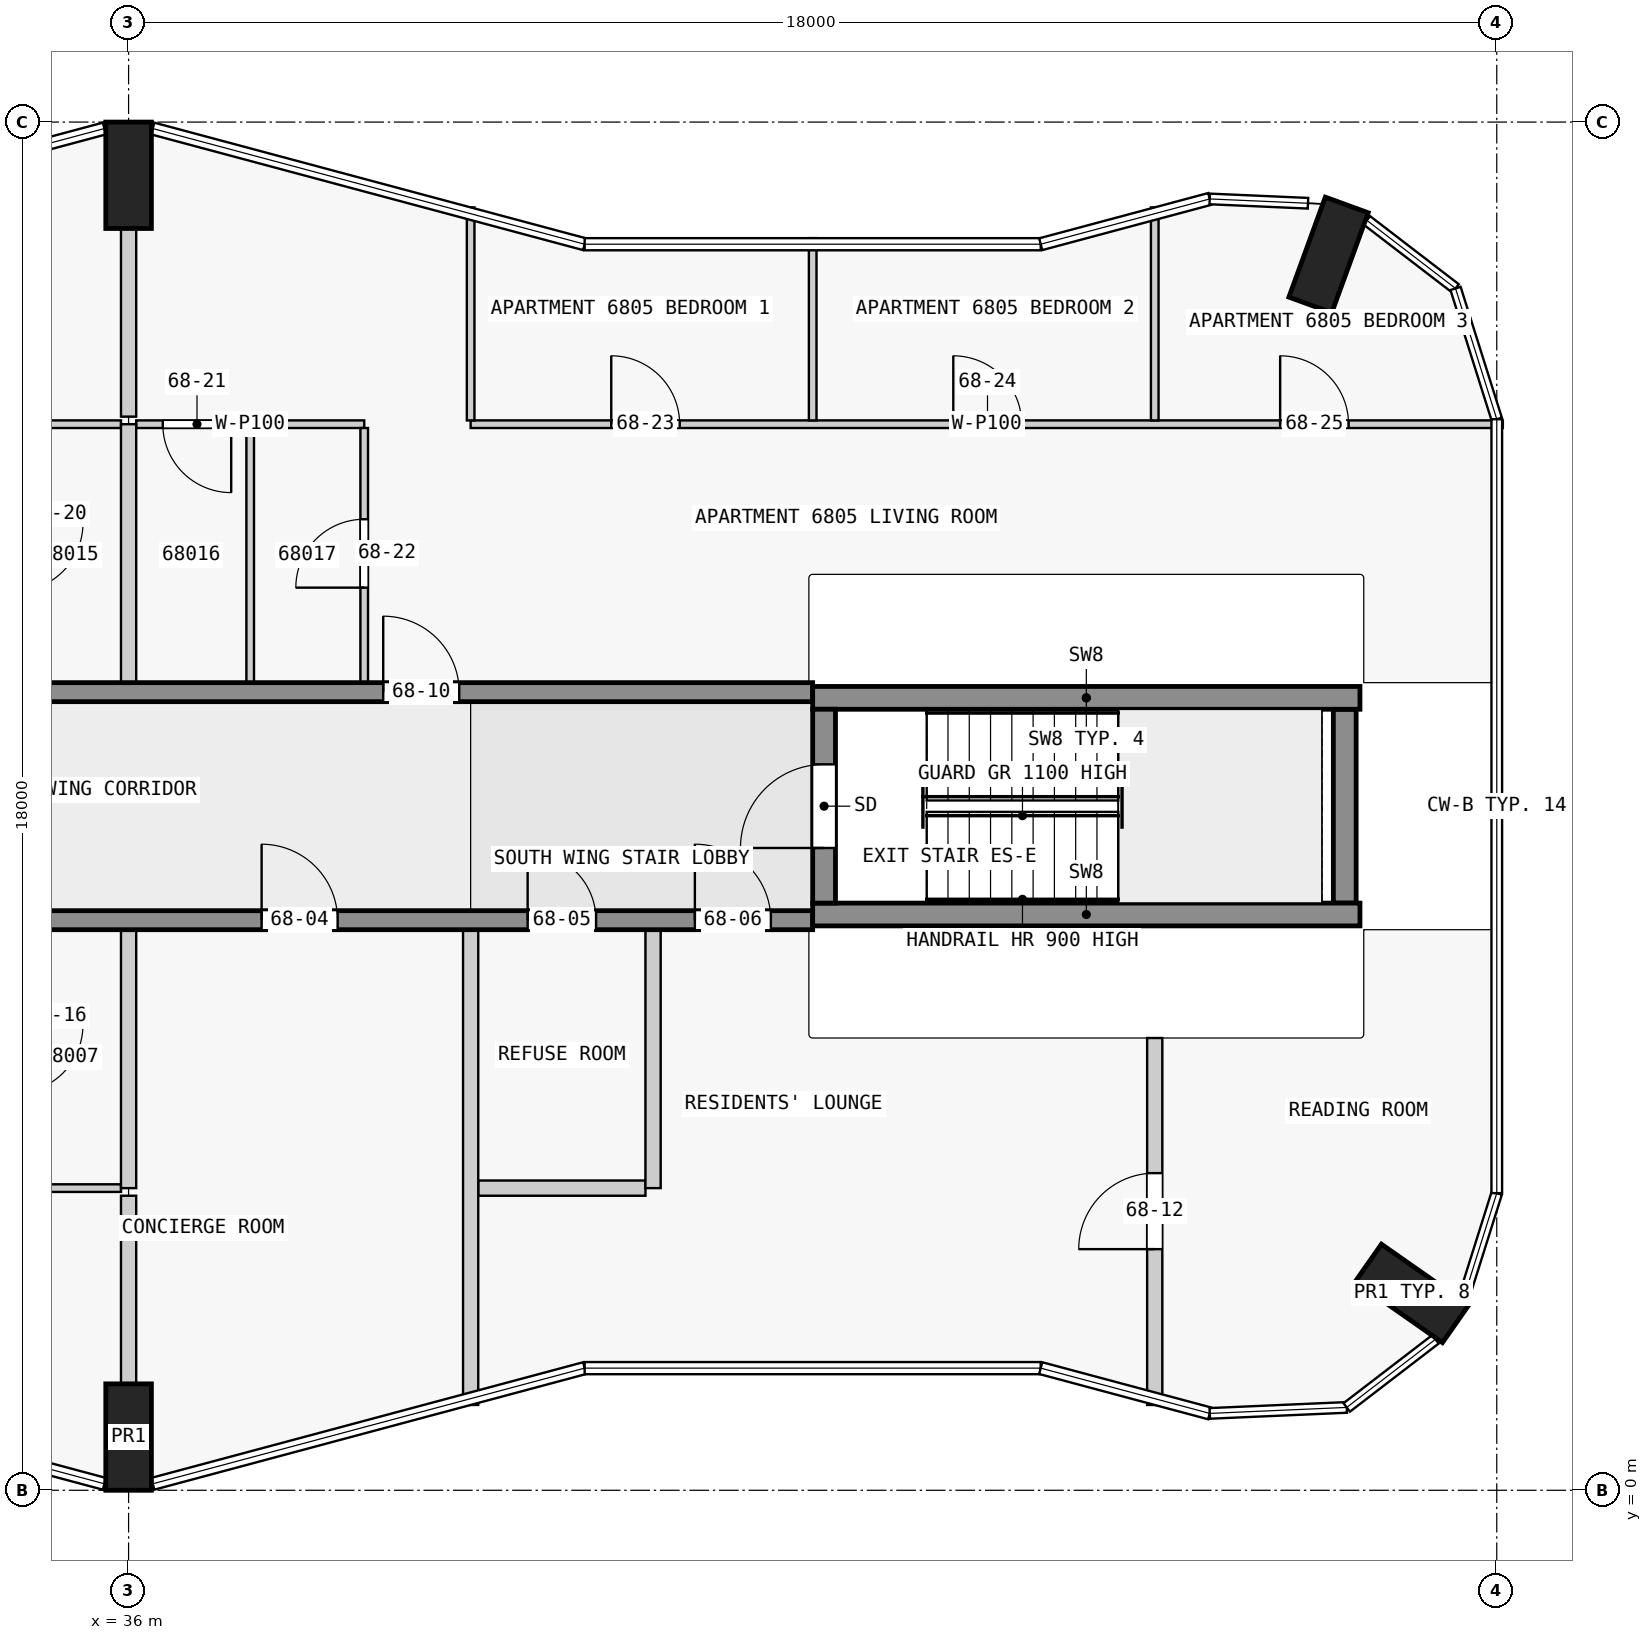
"""IFC4 building model, lengths in metres.
Left out: names, types, materials, properties, quantities, classifications, styles, units other than length and angle.
Written with IfcOpenShell. Run it as: python <this file> out.ifc"""

import sys

from ifc_helpers import new_model, si_unit, direction, frame, frame_2d, origin, origin_2d, place, context, subcontext, project, spatial, rectangle, extrude, element, fill, save


model = new_model("IFC4")
c1 = context("Model", 3, precision=1e-05, world=origin(), true_north=direction((0.0, 1.0)))
c2 = subcontext(c1, "Body", "Model", "MODEL_VIEW")
j1 = project(units=[si_unit("LENGTHUNIT", "METRE"), si_unit("PLANEANGLEUNIT", "RADIAN")], contexts=[c1])
p1 = place(None, origin())
s1 = spatial("IfcSite", under=j1, at=p1, CompositionType="ELEMENT")
p2 = place(p1, origin())
s2 = spatial("IfcBuilding", under=s1, at=p2, CompositionType="ELEMENT")
p3 = place(p2, frame((0.0, 0.0, 259.9)))
s3 = spatial("IfcBuildingStorey", under=s2, at=p3, CompositionType="ELEMENT", Elevation=259.9)
for number, where, z_axis, x_axis in (
    (1, (36.0, 0.7, 0.0), (0.0, 0.0, 1.0), (1.0, 0.0, 0.0)),
    (2, (52.884, 2.59, 0.0), (0.0, 0.0, 1.0), (0.574, 0.819, 0.0)),
    (3, (51.787, 16.252, 0.0), (0.0, 0.0, 1.0), (-0.94, 0.342, 0.0)),
    (4, (36.0, 17.3, 0.0), (0.0, 0.0, 1.0), (1.0, 0.0, 0.0)),
):
    element("IfcColumn", number, at=place(p3, frame(where, z_axis=z_axis, x_axis=x_axis)), inside=s3, PredefinedType="COLUMN", context=c2, shape_type="SweptSolid", body=[
        extrude(rectangle(XDim=0.6, YDim=1.4, at=origin_2d()), origin(), (0.0, 0.0, 1.0), 3.5),
    ])
p4 = place(p3, frame((45.15, 7.725, 0.0), z_axis=(0.0, 0.0, 1.0), x_axis=(0.0, 1.0, 0.0)))
e5 = element("IfcWall", 5, at=p4, inside=s3, PredefinedType="SHEAR", context=c2, shape_type="SweptSolid", body=[
    extrude(rectangle(XDim=2.55, YDim=0.3, at=frame_2d((1.275, 0.0))), origin(), (0.0, 0.0, 1.0), 3.5),
])
p5 = place(p4, frame((0.725, 0.0, 0.0)))
e6 = element("IfcOpeningElement", 6, at=p5, cuts=e5, PredefinedType="OPENING", context=c2, shape_type="SweptSolid", body=[
    extrude(rectangle(XDim=1.1, YDim=2.1, at=frame_2d((0.55, 1.05))), frame((0.0, 0.16, 0.0), z_axis=(0.0, -1.0, 0.0), x_axis=(1.0, 0.0, 0.0)), (0.0, 0.0, 1.0), 0.32),
])
p6 = place(p3, frame((52.0, 7.725, 0.0), z_axis=(0.0, 0.0, 1.0), x_axis=(0.0, 1.0, 0.0)))
e7 = element("IfcWall", 7, at=p6, inside=s3, PredefinedType="SHEAR", context=c2, shape_type="SweptSolid", body=[
    extrude(rectangle(XDim=2.55, YDim=0.3, at=frame_2d((1.275, 0.0))), origin(), (0.0, 0.0, 1.0), 3.5),
])
for number, where, z_axis, x_axis in (
    (8, (45.0, 7.575, 0.0), (0.0, 0.0, 1.0), (1.0, 0.0, 0.0)),
    (9, (45.0, 10.425, 0.0), (0.0, 0.0, 1.0), (1.0, 0.0, 0.0)),
):
    element("IfcWall", number, at=place(p3, frame(where, z_axis=z_axis, x_axis=x_axis)), inside=s3, PredefinedType="SHEAR", context=c2, shape_type="SweptSolid", body=[
        extrude(rectangle(XDim=7.2, YDim=0.3, at=frame_2d((3.6, 0.0))), origin(), (0.0, 0.0, 1.0), 3.5),
    ])
p7 = place(p3, frame((22.5, 7.5, 0.0), z_axis=(0.0, 0.0, 1.0), x_axis=(1.0, 0.0, 0.0)))
e10 = element("IfcWall", 10, at=p7, inside=s3, PredefinedType="SHEAR", context=c2, shape_type="SweptSolid", body=[
    extrude(rectangle(XDim=22.5, YDim=0.25, at=frame_2d((11.25, 0.0))), origin(), (0.0, 0.0, 1.0), 3.25),
])
p8 = place(p7, frame((1.75, 0.0, 0.0)))
e11 = element("IfcOpeningElement", 11, at=p8, cuts=e10, PredefinedType="OPENING", context=c2, shape_type="SweptSolid", body=[
    extrude(rectangle(XDim=1.0, YDim=2.1, at=frame_2d((0.5, 1.05))), frame((0.0, 0.135, 0.0), z_axis=(0.0, -1.0, 0.0), x_axis=(1.0, 0.0, 0.0)), (0.0, 0.0, 1.0), 0.27),
])
p9 = place(p7, frame((5.85, 0.0, 0.0)))
e12 = element("IfcOpeningElement", 12, at=p9, cuts=e10, PredefinedType="OPENING", context=c2, shape_type="SweptSolid", body=[
    extrude(rectangle(XDim=1.8, YDim=2.1, at=frame_2d((0.9, 1.05))), frame((0.0, 0.135, 0.0), z_axis=(0.0, -1.0, 0.0), x_axis=(1.0, 0.0, 0.0)), (0.0, 0.0, 1.0), 0.27),
])
p10 = place(p7, frame((10.75, 0.0, 0.0)))
e13 = element("IfcOpeningElement", 13, at=p10, cuts=e10, PredefinedType="OPENING", context=c2, shape_type="SweptSolid", body=[
    extrude(rectangle(XDim=1.0, YDim=2.1, at=frame_2d((0.5, 1.05))), frame((0.0, 0.135, 0.0), z_axis=(0.0, -1.0, 0.0), x_axis=(1.0, 0.0, 0.0)), (0.0, 0.0, 1.0), 0.27),
])
p11 = place(p7, frame((15.25, 0.0, 0.0)))
e14 = element("IfcOpeningElement", 14, at=p11, cuts=e10, PredefinedType="OPENING", context=c2, shape_type="SweptSolid", body=[
    extrude(rectangle(XDim=1.0, YDim=2.1, at=frame_2d((0.5, 1.05))), frame((0.0, 0.135, 0.0), z_axis=(0.0, -1.0, 0.0), x_axis=(1.0, 0.0, 0.0)), (0.0, 0.0, 1.0), 0.27),
])
p12 = place(p7, frame((18.75, 0.0, 0.0)))
e15 = element("IfcOpeningElement", 15, at=p12, cuts=e10, PredefinedType="OPENING", context=c2, shape_type="SweptSolid", body=[
    extrude(rectangle(XDim=0.9, YDim=2.1, at=frame_2d((0.45, 1.05))), frame((0.0, 0.135, 0.0), z_axis=(0.0, -1.0, 0.0), x_axis=(1.0, 0.0, 0.0)), (0.0, 0.0, 1.0), 0.27),
])
p13 = place(p7, frame((20.95, 0.0, 0.0)))
e16 = element("IfcOpeningElement", 16, at=p13, cuts=e10, PredefinedType="OPENING", context=c2, shape_type="SweptSolid", body=[
    extrude(rectangle(XDim=1.0, YDim=2.1, at=frame_2d((0.5, 1.05))), frame((0.0, 0.135, 0.0), z_axis=(0.0, -1.0, 0.0), x_axis=(1.0, 0.0, 0.0)), (0.0, 0.0, 1.0), 0.27),
])
p14 = place(p3, frame((22.5, 10.5, 0.0), z_axis=(0.0, 0.0, 1.0), x_axis=(1.0, 0.0, 0.0)))
e17 = element("IfcWall", 17, at=p14, inside=s3, PredefinedType="SHEAR", context=c2, shape_type="SweptSolid", body=[
    extrude(rectangle(XDim=22.5, YDim=0.25, at=frame_2d((11.25, 0.0))), origin(), (0.0, 0.0, 1.0), 3.25),
])
p15 = place(p14, frame((1.75, 0.0, 0.0)))
e18 = element("IfcOpeningElement", 18, at=p15, cuts=e17, PredefinedType="OPENING", context=c2, shape_type="SweptSolid", body=[
    extrude(rectangle(XDim=1.0, YDim=2.1, at=frame_2d((0.5, 1.05))), frame((0.0, 0.135, 0.0), z_axis=(0.0, -1.0, 0.0), x_axis=(1.0, 0.0, 0.0)), (0.0, 0.0, 1.0), 0.27),
])
p16 = place(p14, frame((6.25, 0.0, 0.0)))
e19 = element("IfcOpeningElement", 19, at=p16, cuts=e17, PredefinedType="OPENING", context=c2, shape_type="SweptSolid", body=[
    extrude(rectangle(XDim=1.0, YDim=2.1, at=frame_2d((0.5, 1.05))), frame((0.0, 0.135, 0.0), z_axis=(0.0, -1.0, 0.0), x_axis=(1.0, 0.0, 0.0)), (0.0, 0.0, 1.0), 0.27),
])
p17 = place(p14, frame((10.75, 0.0, 0.0)))
e20 = element("IfcOpeningElement", 20, at=p17, cuts=e17, PredefinedType="OPENING", context=c2, shape_type="SweptSolid", body=[
    extrude(rectangle(XDim=1.0, YDim=2.1, at=frame_2d((0.5, 1.05))), frame((0.0, 0.135, 0.0), z_axis=(0.0, -1.0, 0.0), x_axis=(1.0, 0.0, 0.0)), (0.0, 0.0, 1.0), 0.27),
])
p18 = place(p14, frame((16.85, 0.0, 0.0)))
e21 = element("IfcOpeningElement", 21, at=p18, cuts=e17, PredefinedType="OPENING", context=c2, shape_type="SweptSolid", body=[
    extrude(rectangle(XDim=1.0, YDim=2.1, at=frame_2d((0.5, 1.05))), frame((0.0, 0.135, 0.0), z_axis=(0.0, -1.0, 0.0), x_axis=(1.0, 0.0, 0.0)), (0.0, 0.0, 1.0), 0.27),
])
p19 = place(p3, frame((34.55, 3.975, 0.0), z_axis=(0.0, 0.0, 1.0), x_axis=(1.0, 0.0, 0.0)))
e22 = element("IfcWall", 22, at=p19, inside=s3, PredefinedType="PARTITIONING", context=c2, shape_type="SweptSolid", body=[
    extrude(rectangle(XDim=1.35, YDim=0.1, at=frame_2d((0.675, 0.0))), origin(), (0.0, 0.0, 1.0), 3.25),
])
p20 = place(p3, frame((40.6, 3.975, 0.0), z_axis=(0.0, 0.0, 1.0), x_axis=(1.0, 0.0, 0.0)))
e23 = element("IfcWall", 23, at=p20, inside=s3, PredefinedType="PARTITIONING", context=c2, shape_type="SweptSolid", body=[
    extrude(rectangle(XDim=2.2, YDim=0.2, at=frame_2d((1.1, 0.0))), origin(), (0.0, 0.0, 1.0), 3.25),
])
p21 = place(p3, frame((35.9, 14.025, 0.0), z_axis=(0.0, 0.0, 1.0), x_axis=(-1.0, 0.0, 0.0)))
e24 = element("IfcWall", 24, at=p21, inside=s3, PredefinedType="PARTITIONING", context=c2, shape_type="SweptSolid", body=[
    extrude(rectangle(XDim=1.4, YDim=0.1, at=frame_2d((0.7, 0.0))), origin(), (0.0, 0.0, 1.0), 3.25),
])
p22 = place(p3, frame((39.1, 14.025, 0.0), z_axis=(0.0, 0.0, 1.0), x_axis=(-1.0, 0.0, 0.0)))
e25 = element("IfcWall", 25, at=p22, inside=s3, PredefinedType="PARTITIONING", context=c2, shape_type="SweptSolid", body=[
    extrude(rectangle(XDim=3.0, YDim=0.1, at=frame_2d((1.5, 0.0))), origin(), (0.0, 0.0, 1.0), 3.25),
])
p23 = place(p22, frame((1.75, 0.0, 0.0)))
e26 = element("IfcOpeningElement", 26, at=p23, cuts=e25, PredefinedType="OPENING", context=c2, shape_type="SweptSolid", body=[
    extrude(rectangle(XDim=0.9, YDim=2.1, at=frame_2d((0.45, 1.05))), frame((0.0, 0.06, 0.0), z_axis=(0.0, -1.0, 0.0), x_axis=(1.0, 0.0, 0.0)), (0.0, 0.0, 1.0), 0.12),
])
p24 = place(p3, frame((40.5, 14.025, 0.0), z_axis=(0.0, 0.0, 1.0), x_axis=(1.0, 0.0, 0.0)))
e27 = element("IfcWall", 27, at=p24, inside=s3, PredefinedType="PARTITIONING", context=c2, shape_type="SweptSolid", body=[
    extrude(rectangle(XDim=13.58, YDim=0.1, at=frame_2d((6.79, 0.0))), origin(), (0.0, 0.0, 1.0), 3.25),
])
p25 = place(p24, frame((1.85, 0.0, 0.0)))
e28 = element("IfcOpeningElement", 28, at=p25, cuts=e27, PredefinedType="OPENING", context=c2, shape_type="SweptSolid", body=[
    extrude(rectangle(XDim=0.9, YDim=2.1, at=frame_2d((0.45, 1.05))), frame((0.0, 0.06, 0.0), z_axis=(0.0, -1.0, 0.0), x_axis=(1.0, 0.0, 0.0)), (0.0, 0.0, 1.0), 0.12),
])
p26 = place(p24, frame((6.35, 0.0, 0.0)))
e29 = element("IfcOpeningElement", 29, at=p26, cuts=e27, PredefinedType="OPENING", context=c2, shape_type="SweptSolid", body=[
    extrude(rectangle(XDim=0.9, YDim=2.1, at=frame_2d((0.45, 1.05))), frame((0.0, 0.06, 0.0), z_axis=(0.0, -1.0, 0.0), x_axis=(1.0, 0.0, 0.0)), (0.0, 0.0, 1.0), 0.12),
])
p27 = place(p24, frame((10.65, 0.0, 0.0)))
e30 = element("IfcOpeningElement", 30, at=p27, cuts=e27, PredefinedType="OPENING", context=c2, shape_type="SweptSolid", body=[
    extrude(rectangle(XDim=0.9, YDim=2.1, at=frame_2d((0.45, 1.05))), frame((0.0, 0.06, 0.0), z_axis=(0.0, -1.0, 0.0), x_axis=(1.0, 0.0, 0.0)), (0.0, 0.0, 1.0), 0.12),
])
for number, where, z_axis, x_axis in (
    (31, (36.0, 3.875, 0.0), (0.0, 0.0, 1.0), (0.0, -1.0, 0.0)),
    (32, (36.0, 16.6, 0.0), (0.0, 0.0, 1.0), (0.0, -1.0, 0.0)),
):
    element("IfcWall", number, at=place(p3, frame(where, z_axis=z_axis, x_axis=x_axis)), inside=s3, PredefinedType="PARTITIONING", context=c2, shape_type="SweptSolid", body=[
        extrude(rectangle(XDim=2.475, YDim=0.2, at=frame_2d((1.238, 0.0))), origin(), (0.0, 0.0, 1.0), 3.25),
    ])
for number, where, z_axis, x_axis in (
    (33, (36.0, 3.975, 0.0), (0.0, 0.0, 1.0), (0.0, 1.0, 0.0)),
    (34, (36.0, 10.625, 0.0), (0.0, 0.0, 1.0), (0.0, 1.0, 0.0)),
):
    element("IfcWall", number, at=place(p3, frame(where, z_axis=z_axis, x_axis=x_axis)), inside=s3, PredefinedType="PARTITIONING", context=c2, shape_type="SweptSolid", body=[
        extrude(rectangle(XDim=3.4, YDim=0.2, at=frame_2d((1.7, 0.0))), origin(), (0.0, 0.0, 1.0), 3.25),
    ])
p28 = place(p3, frame((37.6, 10.625, 0.0), z_axis=(0.0, 0.0, 1.0), x_axis=(0.0, 1.0, 0.0)))
e35 = element("IfcWall", 35, at=p28, inside=s3, PredefinedType="PARTITIONING", context=c2, shape_type="SweptSolid", body=[
    extrude(rectangle(XDim=3.35, YDim=0.1, at=frame_2d((1.675, 0.0))), origin(), (0.0, 0.0, 1.0), 3.25),
])
p29 = place(p3, frame((39.1, 10.625, 0.0), z_axis=(0.0, 0.0, 1.0), x_axis=(0.0, 1.0, 0.0)))
e36 = element("IfcWall", 36, at=p29, inside=s3, PredefinedType="PARTITIONING", context=c2, shape_type="SweptSolid", body=[
    extrude(rectangle(XDim=3.35, YDim=0.1, at=frame_2d((1.675, 0.0))), origin(), (0.0, 0.0, 1.0), 3.25),
])
p30 = place(p29, frame((1.25, 0.0, 0.0)))
e37 = element("IfcOpeningElement", 37, at=p30, cuts=e36, PredefinedType="OPENING", context=c2, shape_type="SweptSolid", body=[
    extrude(rectangle(XDim=0.9, YDim=2.1, at=frame_2d((0.45, 1.05))), frame((0.0, 0.06, 0.0), z_axis=(0.0, -1.0, 0.0), x_axis=(1.0, 0.0, 0.0)), (0.0, 0.0, 1.0), 0.12),
])
p31 = place(p3, frame((40.5, 16.878, 0.0), z_axis=(0.0, 0.0, 1.0), x_axis=(0.0, -1.0, 0.0)))
e38 = element("IfcWall", 38, at=p31, inside=s3, PredefinedType="PARTITIONING", context=c2, shape_type="SweptSolid", body=[
    extrude(rectangle(XDim=2.803, YDim=0.1, at=frame_2d((1.401, 0.0))), origin(), (0.0, 0.0, 1.0), 3.25),
])
p32 = place(p3, frame((40.5, 1.122, 0.0), z_axis=(0.0, 0.0, 1.0), x_axis=(0.0, 1.0, 0.0)))
e39 = element("IfcWall", 39, at=p32, inside=s3, PredefinedType="PARTITIONING", context=c2, shape_type="SweptSolid", body=[
    extrude(rectangle(XDim=6.253, YDim=0.2, at=frame_2d((3.126, 0.0))), origin(), (0.0, 0.0, 1.0), 3.25),
])
p33 = place(p3, frame((42.9, 3.975, 0.0), z_axis=(0.0, 0.0, 1.0), x_axis=(0.0, 1.0, 0.0)))
e40 = element("IfcWall", 40, at=p33, inside=s3, PredefinedType="PARTITIONING", context=c2, shape_type="SweptSolid", body=[
    extrude(rectangle(XDim=3.4, YDim=0.2, at=frame_2d((1.7, 0.0))), origin(), (0.0, 0.0, 1.0), 3.25),
])
p34 = place(p3, frame((45.0, 14.075, 0.0), z_axis=(0.0, 0.0, 1.0), x_axis=(0.0, 1.0, 0.0)))
e41 = element("IfcWall", 41, at=p34, inside=s3, PredefinedType="PARTITIONING", context=c2, shape_type="SweptSolid", body=[
    extrude(rectangle(XDim=2.398, YDim=0.1, at=frame_2d((1.199, 0.0))), origin(), (0.0, 0.0, 1.0), 3.25),
])
p35 = place(p3, frame((49.5, 14.075, 0.0), z_axis=(0.0, 0.0, 1.0), x_axis=(0.0, 1.0, 0.0)))
e42 = element("IfcWall", 42, at=p35, inside=s3, PredefinedType="PARTITIONING", context=c2, shape_type="SweptSolid", body=[
    extrude(rectangle(XDim=2.803, YDim=0.1, at=frame_2d((1.401, 0.0))), origin(), (0.0, 0.0, 1.0), 3.25),
])
p36 = place(p3, frame((49.5, 1.122, 0.0), z_axis=(0.0, 0.0, 1.0), x_axis=(0.0, 1.0, 0.0)))
e43 = element("IfcWall", 43, at=p36, inside=s3, PredefinedType="PARTITIONING", context=c2, shape_type="SweptSolid", body=[
    extrude(rectangle(XDim=4.828, YDim=0.2, at=frame_2d((2.414, 0.0))), origin(), (0.0, 0.0, 1.0), 3.25),
])
p37 = place(p36, frame((2.05, 0.0, 0.0)))
e44 = element("IfcOpeningElement", 44, at=p37, cuts=e43, PredefinedType="OPENING", context=c2, shape_type="SweptSolid", body=[
    extrude(rectangle(XDim=1.0, YDim=2.1, at=frame_2d((0.5, 1.05))), frame((0.0, 0.11, 0.0), z_axis=(0.0, -1.0, 0.0), x_axis=(1.0, 0.0, 0.0)), (0.0, 0.0, 1.0), 0.22),
])
p38 = place(p5, origin())
e45 = element("IfcDoor", 45, at=p38, inside=s3, OperationType="SINGLE_SWING_LEFT", PredefinedType="DOOR", context=c2, shape_type="SweptSolid", body=[
    extrude(rectangle(XDim=1.1, YDim=2.1, at=frame_2d((0.55, 1.05))), frame((0.0, 0.025, 0.0), z_axis=(0.0, -1.0, 0.0), x_axis=(1.0, 0.0, 0.0)), (0.0, 0.0, 1.0), 0.05),
])
fill(e6, e45)
p39 = place(p11, origin())
e46 = element("IfcDoor", 46, at=p39, inside=s3, OperationType="SINGLE_SWING_RIGHT", PredefinedType="DOOR", context=c2, shape_type="SweptSolid", body=[
    extrude(rectangle(XDim=1.0, YDim=2.1, at=frame_2d((0.5, 1.05))), frame((0.0, 0.025, 0.0), z_axis=(0.0, -1.0, 0.0), x_axis=(1.0, 0.0, 0.0)), (0.0, 0.0, 1.0), 0.05),
])
fill(e14, e46)
p40 = place(p12, origin())
e47 = element("IfcDoor", 47, at=p40, inside=s3, OperationType="SINGLE_SWING_RIGHT", PredefinedType="DOOR", context=c2, shape_type="SweptSolid", body=[
    extrude(rectangle(XDim=0.9, YDim=2.1, at=frame_2d((0.45, 1.05))), frame((0.0, 0.025, 0.0), z_axis=(0.0, -1.0, 0.0), x_axis=(1.0, 0.0, 0.0)), (0.0, 0.0, 1.0), 0.05),
])
fill(e15, e47)
p41 = place(p13, origin())
e48 = element("IfcDoor", 48, at=p41, inside=s3, OperationType="SINGLE_SWING_RIGHT", PredefinedType="DOOR", context=c2, shape_type="SweptSolid", body=[
    extrude(rectangle(XDim=1.0, YDim=2.1, at=frame_2d((0.5, 1.05))), frame((0.0, 0.025, 0.0), z_axis=(0.0, -1.0, 0.0), x_axis=(1.0, 0.0, 0.0)), (0.0, 0.0, 1.0), 0.05),
])
fill(e16, e48)
p42 = place(p18, origin())
e49 = element("IfcDoor", 49, at=p42, inside=s3, OperationType="SINGLE_SWING_RIGHT", PredefinedType="DOOR", context=c2, shape_type="SweptSolid", body=[
    extrude(rectangle(XDim=1.0, YDim=2.1, at=frame_2d((0.5, 1.05))), frame((0.0, 0.025, 0.0), z_axis=(0.0, -1.0, 0.0), x_axis=(1.0, 0.0, 0.0)), (0.0, 0.0, 1.0), 0.05),
])
fill(e21, e49)
p43 = place(p37, origin())
e50 = element("IfcDoor", 50, at=p43, inside=s3, OperationType="SINGLE_SWING_RIGHT", PredefinedType="DOOR", context=c2, shape_type="SweptSolid", body=[
    extrude(rectangle(XDim=1.0, YDim=2.1, at=frame_2d((0.5, 1.05))), frame((0.0, 0.025, 0.0), z_axis=(0.0, -1.0, 0.0), x_axis=(1.0, 0.0, 0.0)), (0.0, 0.0, 1.0), 0.05),
])
fill(e44, e50)
p44 = place(p23, origin())
e51 = element("IfcDoor", 51, at=p44, inside=s3, OperationType="SINGLE_SWING_RIGHT", PredefinedType="DOOR", context=c2, shape_type="SweptSolid", body=[
    extrude(rectangle(XDim=0.9, YDim=2.1, at=frame_2d((0.45, 1.05))), frame((0.0, 0.025, 0.0), z_axis=(0.0, -1.0, 0.0), x_axis=(1.0, 0.0, 0.0)), (0.0, 0.0, 1.0), 0.05),
])
fill(e26, e51)
p45 = place(p30, origin())
e52 = element("IfcDoor", 52, at=p45, inside=s3, OperationType="SINGLE_SWING_RIGHT", PredefinedType="DOOR", context=c2, shape_type="SweptSolid", body=[
    extrude(rectangle(XDim=0.9, YDim=2.1, at=frame_2d((0.45, 1.05))), frame((0.0, 0.025, 0.0), z_axis=(0.0, -1.0, 0.0), x_axis=(1.0, 0.0, 0.0)), (0.0, 0.0, 1.0), 0.05),
])
fill(e37, e52)
p46 = place(p25, origin())
e53 = element("IfcDoor", 53, at=p46, inside=s3, OperationType="SINGLE_SWING_LEFT", PredefinedType="DOOR", context=c2, shape_type="SweptSolid", body=[
    extrude(rectangle(XDim=0.9, YDim=2.1, at=frame_2d((0.45, 1.05))), frame((0.0, 0.025, 0.0), z_axis=(0.0, -1.0, 0.0), x_axis=(1.0, 0.0, 0.0)), (0.0, 0.0, 1.0), 0.05),
])
fill(e28, e53)
p47 = place(p26, origin())
e54 = element("IfcDoor", 54, at=p47, inside=s3, OperationType="SINGLE_SWING_RIGHT", PredefinedType="DOOR", context=c2, shape_type="SweptSolid", body=[
    extrude(rectangle(XDim=0.9, YDim=2.1, at=frame_2d((0.45, 1.05))), frame((0.0, 0.025, 0.0), z_axis=(0.0, -1.0, 0.0), x_axis=(1.0, 0.0, 0.0)), (0.0, 0.0, 1.0), 0.05),
])
fill(e29, e54)
p48 = place(p27, origin())
e55 = element("IfcDoor", 55, at=p48, inside=s3, OperationType="SINGLE_SWING_RIGHT", PredefinedType="DOOR", context=c2, shape_type="SweptSolid", body=[
    extrude(rectangle(XDim=0.9, YDim=2.1, at=frame_2d((0.45, 1.05))), frame((0.0, 0.025, 0.0), z_axis=(0.0, -1.0, 0.0), x_axis=(1.0, 0.0, 0.0)), (0.0, 0.0, 1.0), 0.05),
])
fill(e30, e55)
save(model, sys.argv[1])
